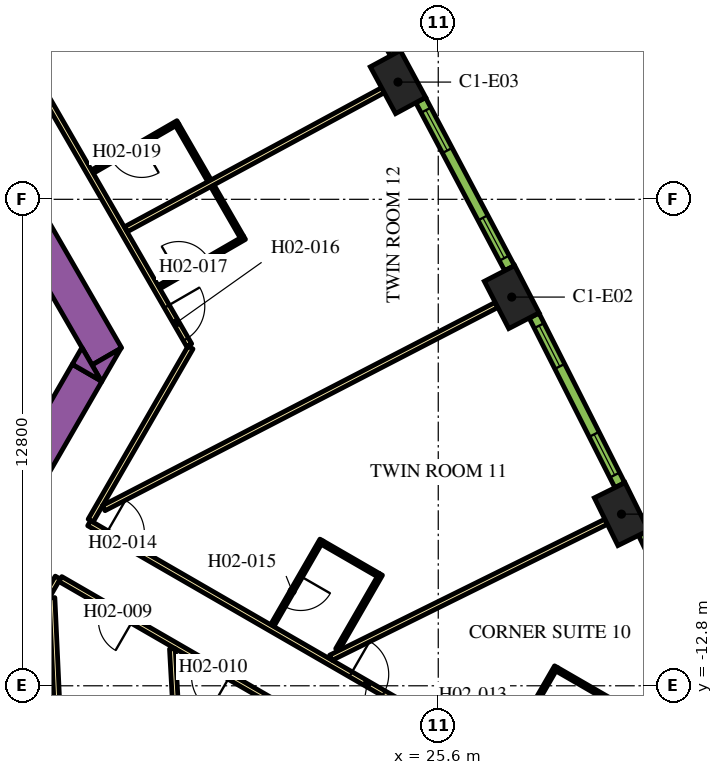
"""IFC4 building model, lengths in metres.
Left out: names, types, materials, properties, quantities, classifications, styles, units other than length and angle.
Written with IfcOpenShell. Run it as: python <this file> out.ifc"""

import sys

from ifc_helpers import new_model, si_unit, direction, frame, frame_2d, origin, origin_2d, place, context, subcontext, project, spatial, polyline, rectangle, outline, extrude, element, fill, save


model = new_model("IFC4")
c1 = context("Model", 3, precision=1e-05, world=origin(), true_north=direction((0.0, 1.0)))
c2 = subcontext(c1, "Body", "Model", "MODEL_VIEW")
j1 = project(units=[si_unit("LENGTHUNIT", "METRE"), si_unit("PLANEANGLEUNIT", "RADIAN")], contexts=[c1])
p1 = place(None, origin())
s1 = spatial("IfcSite", under=j1, at=p1, CompositionType="ELEMENT")
p2 = place(p1, origin())
s2 = spatial("IfcBuilding", under=s1, at=p2, CompositionType="ELEMENT")
p3 = place(p2, frame((0.0, 0.0, 47.1)))
s3 = spatial("IfcBuildingStorey", under=s2, at=p3, CompositionType="ELEMENT", Elevation=47.1)
for number, where, z_axis, x_axis in (
    (1, (30.421, -8.284, 0.0), (0.0, 0.0, 1.0), (-0.443, 0.897, 0.0)),
    (2, (27.533, -2.572, 0.0), (0.0, 0.0, 1.0), (-0.459, 0.888, 0.0)),
    (3, (24.54, 3.085, 0.0), (0.0, 0.0, 1.0), (-0.476, 0.88, 0.0)),
):
    element("IfcColumn", number, at=place(p3, frame(where, z_axis=z_axis, x_axis=x_axis)), inside=s3, PredefinedType="COLUMN", context=c2, shape_type="SweptSolid", body=[
        extrude(rectangle(XDim=1.4, YDim=0.9, at=origin_2d()), origin(), (0.0, 0.0, 1.0), 3.9),
    ])
p4 = place(p3, frame((6.776, 13.364, 0.0), z_axis=(0.0, 0.0, 1.0), x_axis=(0.500004177138, -0.8660229921, 0.0)))
e4 = element("IfcWall", 4, at=p4, inside=s3, PredefinedType="SOLIDWALL", context=c2, shape_type="SweptSolid", body=[
    extrude(rectangle(XDim=20.204, YDim=0.9, at=frame_2d((10.102, 0.0))), origin(), (0.0, 0.0, 1.0), 3.9),
])
p5 = place(p3, origin())
e5 = element("IfcWall", 5, at=p5, inside=s3, PredefinedType="SOLIDWALL", context=c2, shape_type="SweptSolid", body=[
    extrude(outline(polyline([(16.743, -4.8), (16.489, -4.36), (17.251, -3.92), (16.743, -4.8)])), origin(), (0.0, 0.0, 1.0), 3.9),
])
p6 = place(p3, frame((11.943, -12.214, 0.0), z_axis=(0.0, 0.0, 1.0), x_axis=(0.49998092645, 0.866036415623, 0.0)))
e6 = element("IfcWall", 6, at=p6, inside=s3, PredefinedType="SOLIDWALL", context=c2, shape_type="SweptSolid", body=[
    extrude(rectangle(XDim=8.83, YDim=0.9, at=frame_2d((4.415, 0.0))), origin(), (0.0, 0.0, 1.0), 3.9),
])
e7 = element("IfcWall", 7, at=p5, inside=s3, PredefinedType="SOLIDWALL", context=c2, shape_type="SweptSolid", body=[
    extrude(outline(polyline([(16.223, -3.9), (16.732, -4.78), (15.969, -4.34), (16.223, -3.9)])), origin(), (0.0, 0.0, 1.0), 3.9),
])
p7 = place(p3, frame((16.412, -8.523, 0.0), z_axis=(0.0, 0.0, 1.0), x_axis=(0.866022197818, -0.500005552856, 0.0)))
e8 = element("IfcWall", 8, at=p7, inside=s3, PredefinedType="PARTITIONING", context=c2, shape_type="SweptSolid", body=[
    extrude(rectangle(XDim=16.224, YDim=0.15, at=frame_2d((8.112, 0.0))), origin(), (0.0, 0.0, 1.0), 2.75),
])
p8 = place(p7, frame((7.949, 0.0, 0.0)))
e9 = element("IfcOpeningElement", 9, at=p8, cuts=e8, PredefinedType="OPENING", context=c2, shape_type="SweptSolid", body=[
    extrude(rectangle(XDim=1.0, YDim=2.1, at=frame_2d((0.5, 1.05))), frame((0.0, 0.085, 0.0), z_axis=(0.0, -1.0, 0.0), x_axis=(1.0, 0.0, 0.0)), (0.0, 0.0, 1.0), 0.17),
])
p9 = place(p7, frame((0.526, 0.0, 0.0)))
e10 = element("IfcOpeningElement", 10, at=p9, cuts=e8, PredefinedType="OPENING", context=c2, shape_type="SweptSolid", body=[
    extrude(rectangle(XDim=1.0, YDim=2.1, at=frame_2d((0.5, 1.05))), frame((0.0, 0.085, 0.0), z_axis=(0.0, -1.0, 0.0), x_axis=(1.0, 0.0, 0.0)), (0.0, 0.0, 1.0), 0.17),
])
p10 = place(p3, frame((19.081, -3.9, 0.0), z_axis=(0.0, 0.0, 1.0), x_axis=(-0.499974327079, -0.866040225545, 0.0)))
e11 = element("IfcWall", 11, at=p10, inside=s3, PredefinedType="PARTITIONING", context=c2, shape_type="SweptSolid", body=[
    extrude(rectangle(XDim=5.258, YDim=0.15, at=frame_2d((2.629, 0.0))), origin(), (0.0, 0.0, 1.0), 2.75),
])
p11 = place(p3, frame((6.163, 18.475, 0.0), z_axis=(0.0, 0.0, 1.0), x_axis=(0.500001317485, -0.866024643133, 0.0)))
e12 = element("IfcWall", 12, at=p11, inside=s3, PredefinedType="PARTITIONING", context=c2, shape_type="SweptSolid", body=[
    extrude(rectangle(XDim=25.767, YDim=0.15, at=frame_2d((12.883, 0.0))), origin(), (0.0, 0.0, 1.0), 2.75),
])
p12 = place(p11, frame((24.586, 0.0, 0.0)))
e13 = element("IfcOpeningElement", 13, at=p12, cuts=e12, PredefinedType="OPENING", context=c2, shape_type="SweptSolid", body=[
    extrude(rectangle(XDim=1.0, YDim=2.1, at=frame_2d((0.5, 1.05))), frame((0.0, 0.085, 0.0), z_axis=(0.0, -1.0, 0.0), x_axis=(1.0, 0.0, 0.0)), (0.0, 0.0, 1.0), 0.17),
])
p13 = place(p11, frame((16.196, 0.0, 0.0)))
e14 = element("IfcOpeningElement", 14, at=p13, cuts=e12, PredefinedType="OPENING", context=c2, shape_type="SweptSolid", body=[
    extrude(rectangle(XDim=1.0, YDim=2.1, at=frame_2d((0.5, 1.05))), frame((0.0, 0.085, 0.0), z_axis=(0.0, -1.0, 0.0), x_axis=(1.0, 0.0, 0.0)), (0.0, 0.0, 1.0), 0.17),
])
p14 = place(p11, frame((14.789, 0.0, 0.0)))
e15 = element("IfcOpeningElement", 15, at=p14, cuts=e12, PredefinedType="OPENING", context=c2, shape_type="SweptSolid", body=[
    extrude(rectangle(XDim=1.1, YDim=2.1, at=frame_2d((0.55, 1.05))), frame((0.0, 0.085, 0.0), z_axis=(0.0, -1.0, 0.0), x_axis=(1.0, 0.0, 0.0)), (0.0, 0.0, 1.0), 0.17),
])
p15 = place(p11, frame((3.698, 0.0, 0.0)))
e16 = element("IfcOpeningElement", 16, at=p15, cuts=e12, PredefinedType="OPENING", context=c2, shape_type="SweptSolid", body=[
    extrude(rectangle(XDim=1.0, YDim=2.1, at=frame_2d((0.5, 1.05))), frame((0.0, 0.085, 0.0), z_axis=(0.0, -1.0, 0.0), x_axis=(1.0, 0.0, 0.0)), (0.0, 0.0, 1.0), 0.17),
])
p16 = place(p11, frame((2.391, 0.0, 0.0)))
e17 = element("IfcOpeningElement", 17, at=p16, cuts=e12, PredefinedType="OPENING", context=c2, shape_type="SweptSolid", body=[
    extrude(rectangle(XDim=1.0, YDim=2.1, at=frame_2d((0.5, 1.05))), frame((0.0, 0.085, 0.0), z_axis=(0.0, -1.0, 0.0), x_axis=(1.0, 0.0, 0.0)), (0.0, 0.0, 1.0), 0.17),
])
p17 = place(p3, frame((15.587, -9.952, 0.0), z_axis=(0.0, 0.0, 1.0), x_axis=(-0.500016618951, -0.866015808616, 0.0)))
e18 = element("IfcWall", 18, at=p17, inside=s3, PredefinedType="PARTITIONING", context=c2, shape_type="SweptSolid", body=[
    extrude(rectangle(XDim=5.268, YDim=0.15, at=frame_2d((2.634, 0.0))), origin(), (0.0, 0.0, 1.0), 2.75),
])
p18 = place(p17, frame((2.465, 0.0, 0.0)))
e19 = element("IfcOpeningElement", 19, at=p18, cuts=e18, PredefinedType="OPENING", context=c2, shape_type="SweptSolid", body=[
    extrude(rectangle(XDim=0.9, YDim=2.1, at=frame_2d((0.45, 1.05))), frame((0.0, 0.085, 0.0), z_axis=(0.0, -1.0, 0.0), x_axis=(1.0, 0.0, 0.0)), (0.0, 0.0, 1.0), 0.17),
])
p19 = place(p3, frame((29.638, -18.064, 0.0), z_axis=(0.0, 0.0, 1.0), x_axis=(-0.866026175601, 0.499998663172, 0.0)))
e20 = element("IfcWall", 20, at=p19, inside=s3, PredefinedType="PARTITIONING", context=c2, shape_type="SweptSolid", body=[
    extrude(rectangle(XDim=16.144, YDim=0.15, at=frame_2d((8.072, 0.0))), origin(), (0.0, 0.0, 1.0), 2.75),
])
p20 = place(p19, frame((13.948, 0.0, 0.0)))
e21 = element("IfcOpeningElement", 21, at=p20, cuts=e20, PredefinedType="OPENING", context=c2, shape_type="SweptSolid", body=[
    extrude(rectangle(XDim=0.9, YDim=2.1, at=frame_2d((0.45, 1.05))), frame((0.0, 0.085, 0.0), z_axis=(0.0, -1.0, 0.0), x_axis=(1.0, 0.0, 0.0)), (0.0, 0.0, 1.0), 0.17),
])
p21 = place(p19, frame((11.004, 0.0, 0.0)))
e22 = element("IfcOpeningElement", 22, at=p21, cuts=e20, PredefinedType="OPENING", context=c2, shape_type="SweptSolid", body=[
    extrude(rectangle(XDim=1.0, YDim=2.1, at=frame_2d((0.5, 1.05))), frame((0.0, 0.085, 0.0), z_axis=(0.0, -1.0, 0.0), x_axis=(1.0, 0.0, 0.0)), (0.0, 0.0, 1.0), 0.17),
])
p22 = place(p3, frame((15.973, -22.109, 0.0), z_axis=(0.0, 0.0, 1.0), x_axis=(-0.046191717129, 0.998932592955, 0.0)))
e23 = element("IfcWall", 23, at=p22, inside=s3, PredefinedType="PARTITIONING", context=c2, shape_type="SweptSolid", body=[
    extrude(rectangle(XDim=11.638, YDim=0.15, at=frame_2d((5.819, 0.0))), origin(), (0.0, 0.0, 1.0), 2.75),
])
p23 = place(p3, frame((27.134, -2.779, 0.0), z_axis=(0.0, 0.0, 1.0), x_axis=(-0.8882049501, -0.459447457951, 0.0)))
e24 = element("IfcWall", 24, at=p23, inside=s3, PredefinedType="PARTITIONING", context=c2, shape_type="SweptSolid", body=[
    extrude(rectangle(XDim=11.638, YDim=0.15, at=frame_2d((5.819, 0.0))), origin(), (0.0, 0.0, 1.0), 2.75),
])
p24 = place(p3, frame((24.145, 2.871, 0.0), z_axis=(0.0, 0.0, 1.0), x_axis=(-0.879551725039, -0.475803281809, 0.0)))
e25 = element("IfcWall", 25, at=p24, inside=s3, PredefinedType="PARTITIONING", context=c2, shape_type="SweptSolid", body=[
    extrude(rectangle(XDim=7.688, YDim=0.15, at=frame_2d((3.844, 0.0))), origin(), (0.0, 0.0, 1.0), 2.75),
])
p25 = place(p3, frame((19.198, -22.541, 0.0), z_axis=(0.0, 0.0, 1.0), x_axis=(-0.055432210572, 0.99846245299, 0.0)))
e26 = element("IfcWall", 26, at=p25, inside=s3, PredefinedType="PARTITIONING", context=c2, shape_type="SweptSolid", body=[
    extrude(rectangle(XDim=10.729, YDim=0.15, at=frame_2d((5.365, 0.0))), origin(), (0.0, 0.0, 1.0), 2.75),
])
p26 = place(p3, frame((30.018, -8.483, 0.0), z_axis=(0.0, 0.0, 1.0), x_axis=(-0.896544505264, -0.44295366584, 0.0)))
e27 = element("IfcWall", 27, at=p26, inside=s3, PredefinedType="PARTITIONING", context=c2, shape_type="SweptSolid", body=[
    extrude(rectangle(XDim=8.079, YDim=0.15, at=frame_2d((4.04, 0.0))), origin(), (0.0, 0.0, 1.0), 2.75),
])
p27 = place(p3, frame((28.704, -12.3, 0.0), z_axis=(0.0, 0.0, 1.0), x_axis=(-0.49998411664, -0.866034573852, 0.0)))
e28 = element("IfcWall", 28, at=p27, inside=s3, PredefinedType="PARTITIONING", context=c2, shape_type="SweptSolid", body=[
    extrude(rectangle(XDim=2.8, YDim=0.1, at=frame_2d((1.4, 0.0))), origin(), (0.0, 0.0, 1.0), 2.75),
])
p28 = place(p27, frame((1.3, 0.0, 0.0)))
e29 = element("IfcOpeningElement", 29, at=p28, cuts=e28, PredefinedType="OPENING", context=c2, shape_type="SweptSolid", body=[
    extrude(rectangle(XDim=0.9, YDim=2.1, at=frame_2d((0.45, 1.05))), frame((0.0, 0.06, 0.0), z_axis=(0.0, -1.0, 0.0), x_axis=(1.0, 0.0, 0.0)), (0.0, 0.0, 1.0), 0.12),
])
p29 = place(p3, frame((28.722, -12.368, 0.0), z_axis=(0.0, 0.0, 1.0), x_axis=(0.866050077142, -0.499957262057, 0.0)))
e30 = element("IfcWall", 30, at=p29, inside=s3, PredefinedType="PARTITIONING", context=c2, shape_type="SweptSolid", body=[
    extrude(rectangle(XDim=2.4, YDim=0.1, at=frame_2d((1.2, 0.0))), origin(), (0.0, 0.0, 1.0), 2.75),
])
p30 = place(p3, frame((22.53, -8.966, 0.0), z_axis=(0.0, 0.0, 1.0), x_axis=(-0.500006934395, -0.866021400173, 0.0)))
e31 = element("IfcWall", 31, at=p30, inside=s3, PredefinedType="PARTITIONING", context=c2, shape_type="SweptSolid", body=[
    extrude(rectangle(XDim=2.6, YDim=0.1, at=frame_2d((1.3, 0.0))), origin(), (0.0, 0.0, 1.0), 2.75),
])
p31 = place(p30, frame((1.1, 0.0, 0.0)))
e32 = element("IfcOpeningElement", 32, at=p31, cuts=e31, PredefinedType="OPENING", context=c2, shape_type="SweptSolid", body=[
    extrude(rectangle(XDim=0.9, YDim=2.1, at=frame_2d((0.45, 1.05))), frame((0.0, 0.06, 0.0), z_axis=(0.0, -1.0, 0.0), x_axis=(1.0, 0.0, 0.0)), (0.0, 0.0, 1.0), 0.12),
])
p32 = place(p3, frame((22.549, -9.035, 0.0), z_axis=(0.0, 0.0, 1.0), x_axis=(0.86605165483, -0.499954529098, 0.0)))
e33 = element("IfcWall", 33, at=p32, inside=s3, PredefinedType="PARTITIONING", context=c2, shape_type="SweptSolid", body=[
    extrude(rectangle(XDim=1.7, YDim=0.1, at=frame_2d((0.85, 0.0))), origin(), (0.0, 0.0, 1.0), 2.75),
])
p33 = place(p3, frame((22.944, -11.85, 0.0), z_axis=(0.0, 0.0, 1.0), x_axis=(0.499968531483, 0.866043571379, 0.0)))
e34 = element("IfcWall", 34, at=p33, inside=s3, PredefinedType="PARTITIONING", context=c2, shape_type="SweptSolid", body=[
    extrude(rectangle(XDim=2.29, YDim=0.1, at=frame_2d((1.145, 0.0))), origin(), (0.0, 0.0, 1.0), 2.75),
])
p34 = place(p3, frame((18.25, -2.311, 0.0), z_axis=(0.0, 0.0, 1.0), x_axis=(0.866021400173, 0.500006934395, 0.0)))
e35 = element("IfcWall", 35, at=p34, inside=s3, PredefinedType="PARTITIONING", context=c2, shape_type="SweptSolid", body=[
    extrude(rectangle(XDim=2.6, YDim=0.1, at=frame_2d((1.3, 0.0))), origin(), (0.0, 0.0, 1.0), 2.75),
])
p35 = place(p34, frame((0.6, 0.0, 0.0)))
e36 = element("IfcOpeningElement", 36, at=p35, cuts=e35, PredefinedType="OPENING", context=c2, shape_type="SweptSolid", body=[
    extrude(rectangle(XDim=0.9, YDim=2.1, at=frame_2d((0.45, 1.05))), frame((0.0, 0.06, 0.0), z_axis=(0.0, -1.0, 0.0), x_axis=(1.0, 0.0, 0.0)), (0.0, 0.0, 1.0), 0.12),
])
p36 = place(p3, frame((20.434, -0.993, 0.0), z_axis=(0.0, 0.0, 1.0), x_axis=(-0.500086022567, 0.865975732936, 0.0)))
e37 = element("IfcWall", 37, at=p36, inside=s3, PredefinedType="PARTITIONING", context=c2, shape_type="SweptSolid", body=[
    extrude(rectangle(XDim=1.55, YDim=0.1, at=frame_2d((0.775, 0.0))), origin(), (0.0, 0.0, 1.0), 2.75),
])
p37 = place(p3, frame((18.749, 2.026, 0.0), z_axis=(0.0, 0.0, 1.0), x_axis=(-0.866021400173, -0.500006934395, 0.0)))
e38 = element("IfcWall", 38, at=p37, inside=s3, PredefinedType="PARTITIONING", context=c2, shape_type="SweptSolid", body=[
    extrude(rectangle(XDim=2.6, YDim=0.1, at=frame_2d((1.3, 0.0))), origin(), (0.0, 0.0, 1.0), 2.75),
])
p38 = place(p37, frame((1.1, 0.0, 0.0)))
e39 = element("IfcOpeningElement", 39, at=p38, cuts=e38, PredefinedType="OPENING", context=c2, shape_type="SweptSolid", body=[
    extrude(rectangle(XDim=0.9, YDim=2.1, at=frame_2d((0.45, 1.05))), frame((0.0, 0.06, 0.0), z_axis=(0.0, -1.0, 0.0), x_axis=(1.0, 0.0, 0.0)), (0.0, 0.0, 1.0), 0.12),
])
p39 = place(p3, frame((18.731, 1.958, 0.0), z_axis=(0.0, 0.0, 1.0), x_axis=(0.499976720371, -0.866038843867, 0.0)))
e40 = element("IfcWall", 40, at=p39, inside=s3, PredefinedType="PARTITIONING", context=c2, shape_type="SweptSolid", body=[
    extrude(rectangle(XDim=1.69, YDim=0.1, at=frame_2d((0.845, 0.0))), origin(), (0.0, 0.0, 1.0), 2.75),
])
p40 = place(p3, frame((33.176, -13.29, 0.0), z_axis=(0.0, 0.0, 1.0), x_axis=(-0.434664499056, 0.900592456808, 0.0)))
e41 = element("IfcWall", 41, at=p40, inside=s3, PredefinedType="SOLIDWALL", context=c2, shape_type="SweptSolid", body=[
    extrude(rectangle(XDim=5.006, YDim=0.29, at=frame_2d((2.503, 0.0))), origin(), (0.0, 0.0, 1.0), 3.65),
])
p41 = place(p40, frame((0.265, 0.0, 0.9)))
e42 = element("IfcOpeningElement", 42, at=p41, cuts=e41, PredefinedType="OPENING", context=c2, shape_type="SweptSolid", body=[
    extrude(rectangle(XDim=1.2, YDim=2.15, at=frame_2d((0.6, 1.075))), frame((0.0, 0.155, 0.0), z_axis=(0.0, -1.0, 0.0), x_axis=(1.0, 0.0, 0.0)), (0.0, 0.0, 1.0), 0.31),
])
p42 = place(p40, frame((3.496, 0.0, 0.9)))
e43 = element("IfcOpeningElement", 43, at=p42, cuts=e41, PredefinedType="OPENING", context=c2, shape_type="SweptSolid", body=[
    extrude(rectangle(XDim=1.2, YDim=2.15, at=frame_2d((0.6, 1.075))), frame((0.0, 0.155, 0.0), z_axis=(0.0, -1.0, 0.0), x_axis=(1.0, 0.0, 0.0)), (0.0, 0.0, 1.0), 0.31),
])
p43 = place(p3, frame((30.377, -7.521, 0.0), z_axis=(0.0, 0.0, 1.0), x_axis=(-0.451233929645, 0.892405704115, 0.0)))
e44 = element("IfcWall", 44, at=p43, inside=s3, PredefinedType="SOLIDWALL", context=c2, shape_type="SweptSolid", body=[
    extrude(rectangle(XDim=4.998, YDim=0.29, at=frame_2d((2.499, 0.0))), origin(), (0.0, 0.0, 1.0), 3.65),
])
p44 = place(p43, frame((0.297, 0.0, 0.9)))
e45 = element("IfcOpeningElement", 45, at=p44, cuts=e44, PredefinedType="OPENING", context=c2, shape_type="SweptSolid", body=[
    extrude(rectangle(XDim=1.2, YDim=2.15, at=frame_2d((0.6, 1.075))), frame((0.0, 0.155, 0.0), z_axis=(0.0, -1.0, 0.0), x_axis=(1.0, 0.0, 0.0)), (0.0, 0.0, 1.0), 0.31),
])
p45 = place(p43, frame((3.501, 0.0, 0.9)))
e46 = element("IfcOpeningElement", 46, at=p45, cuts=e44, PredefinedType="OPENING", context=c2, shape_type="SweptSolid", body=[
    extrude(rectangle(XDim=1.2, YDim=2.15, at=frame_2d((0.6, 1.075))), frame((0.0, 0.155, 0.0), z_axis=(0.0, -1.0, 0.0), x_axis=(1.0, 0.0, 0.0)), (0.0, 0.0, 1.0), 0.31),
])
p46 = place(p3, frame((27.475, -1.81, 0.0), z_axis=(0.0, 0.0, 1.0), x_axis=(-0.467629620899, 0.883924509026, 0.0)))
e47 = element("IfcWall", 47, at=p46, inside=s3, PredefinedType="SOLIDWALL", context=c2, shape_type="SweptSolid", body=[
    extrude(rectangle(XDim=4.998, YDim=0.29, at=frame_2d((2.499, 0.0))), origin(), (0.0, 0.0, 1.0), 3.65),
])
p47 = place(p46, frame((0.297, 0.0, 0.9)))
e48 = element("IfcOpeningElement", 48, at=p47, cuts=e47, PredefinedType="OPENING", context=c2, shape_type="SweptSolid", body=[
    extrude(rectangle(XDim=1.2, YDim=2.15, at=frame_2d((0.6, 1.075))), frame((0.0, 0.155, 0.0), z_axis=(0.0, -1.0, 0.0), x_axis=(1.0, 0.0, 0.0)), (0.0, 0.0, 1.0), 0.31),
])
p48 = place(p46, frame((3.501, 0.0, 0.9)))
e49 = element("IfcOpeningElement", 49, at=p48, cuts=e47, PredefinedType="OPENING", context=c2, shape_type="SweptSolid", body=[
    extrude(rectangle(XDim=1.2, YDim=2.15, at=frame_2d((0.6, 1.075))), frame((0.0, 0.155, 0.0), z_axis=(0.0, -1.0, 0.0), x_axis=(1.0, 0.0, 0.0)), (0.0, 0.0, 1.0), 0.31),
])
p49 = place(p3, frame((24.468, 3.846, 0.0), z_axis=(0.0, 0.0, 1.0), x_axis=(-0.483912572871, 0.875116347589, 0.0)))
e50 = element("IfcWall", 50, at=p49, inside=s3, PredefinedType="SOLIDWALL", context=c2, shape_type="SweptSolid", body=[
    extrude(rectangle(XDim=4.998, YDim=0.29, at=frame_2d((2.499, 0.0))), origin(), (0.0, 0.0, 1.0), 3.65),
])
p50 = place(p49, frame((0.297, 0.0, 0.9)))
e51 = element("IfcOpeningElement", 51, at=p50, cuts=e50, PredefinedType="OPENING", context=c2, shape_type="SweptSolid", body=[
    extrude(rectangle(XDim=1.2, YDim=2.15, at=frame_2d((0.6, 1.075))), frame((0.0, 0.155, 0.0), z_axis=(0.0, -1.0, 0.0), x_axis=(1.0, 0.0, 0.0)), (0.0, 0.0, 1.0), 0.31),
])
p51 = place(p49, frame((3.501, 0.0, 0.9)))
e52 = element("IfcOpeningElement", 52, at=p51, cuts=e50, PredefinedType="OPENING", context=c2, shape_type="SweptSolid", body=[
    extrude(rectangle(XDim=1.2, YDim=2.15, at=frame_2d((0.6, 1.075))), frame((0.0, 0.155, 0.0), z_axis=(0.0, -1.0, 0.0), x_axis=(1.0, 0.0, 0.0)), (0.0, 0.0, 1.0), 0.31),
])
p52 = place(p20, origin())
e53 = element("IfcDoor", 53, at=p52, inside=s3, OperationType="SINGLE_SWING_RIGHT", PredefinedType="DOOR", context=c2, shape_type="SweptSolid", body=[
    extrude(rectangle(XDim=0.9, YDim=2.1, at=frame_2d((0.45, 1.05))), frame((0.0, 0.025, 0.0), z_axis=(0.0, -1.0, 0.0), x_axis=(1.0, 0.0, 0.0)), (0.0, 0.0, 1.0), 0.05),
])
fill(e21, e53)
p53 = place(p21, origin())
e54 = element("IfcDoor", 54, at=p53, inside=s3, OperationType="SINGLE_SWING_RIGHT", PredefinedType="DOOR", context=c2, shape_type="SweptSolid", body=[
    extrude(rectangle(XDim=1.0, YDim=2.1, at=frame_2d((0.5, 1.05))), frame((0.0, 0.025, 0.0), z_axis=(0.0, -1.0, 0.0), x_axis=(1.0, 0.0, 0.0)), (0.0, 0.0, 1.0), 0.05),
])
fill(e22, e54)
p54 = place(p8, origin())
e55 = element("IfcDoor", 55, at=p54, inside=s3, OperationType="SINGLE_SWING_LEFT", PredefinedType="DOOR", context=c2, shape_type="SweptSolid", body=[
    extrude(rectangle(XDim=1.0, YDim=2.1, at=frame_2d((0.5, 1.05))), frame((0.0, 0.025, 0.0), z_axis=(0.0, -1.0, 0.0), x_axis=(1.0, 0.0, 0.0)), (0.0, 0.0, 1.0), 0.05),
])
fill(e9, e55)
p55 = place(p9, origin())
e56 = element("IfcDoor", 56, at=p55, inside=s3, OperationType="SINGLE_SWING_LEFT", PredefinedType="DOOR", context=c2, shape_type="SweptSolid", body=[
    extrude(rectangle(XDim=1.0, YDim=2.1, at=frame_2d((0.5, 1.05))), frame((0.0, 0.025, 0.0), z_axis=(0.0, -1.0, 0.0), x_axis=(1.0, 0.0, 0.0)), (0.0, 0.0, 1.0), 0.05),
])
fill(e10, e56)
p56 = place(p31, origin())
e57 = element("IfcDoor", 57, at=p56, inside=s3, OperationType="SINGLE_SWING_LEFT", PredefinedType="DOOR", context=c2, shape_type="SweptSolid", body=[
    extrude(rectangle(XDim=0.9, YDim=2.1, at=frame_2d((0.45, 1.05))), frame((0.0, 0.025, 0.0), z_axis=(0.0, -1.0, 0.0), x_axis=(1.0, 0.0, 0.0)), (0.0, 0.0, 1.0), 0.05),
])
fill(e32, e57)
p57 = place(p12, origin())
e58 = element("IfcDoor", 58, at=p57, inside=s3, OperationType="SINGLE_SWING_RIGHT", PredefinedType="DOOR", context=c2, shape_type="SweptSolid", body=[
    extrude(rectangle(XDim=1.0, YDim=2.1, at=frame_2d((0.5, 1.05))), frame((0.0, 0.025, 0.0), z_axis=(0.0, -1.0, 0.0), x_axis=(1.0, 0.0, 0.0)), (0.0, 0.0, 1.0), 0.05),
])
fill(e13, e58)
p58 = place(p35, origin())
e59 = element("IfcDoor", 59, at=p58, inside=s3, OperationType="SINGLE_SWING_RIGHT", PredefinedType="DOOR", context=c2, shape_type="SweptSolid", body=[
    extrude(rectangle(XDim=0.9, YDim=2.1, at=frame_2d((0.45, 1.05))), frame((0.0, 0.025, 0.0), z_axis=(0.0, -1.0, 0.0), x_axis=(1.0, 0.0, 0.0)), (0.0, 0.0, 1.0), 0.05),
])
fill(e36, e59)
p59 = place(p38, origin())
e60 = element("IfcDoor", 60, at=p59, inside=s3, OperationType="SINGLE_SWING_LEFT", PredefinedType="DOOR", context=c2, shape_type="SweptSolid", body=[
    extrude(rectangle(XDim=0.9, YDim=2.1, at=frame_2d((0.45, 1.05))), frame((0.0, 0.025, 0.0), z_axis=(0.0, -1.0, 0.0), x_axis=(1.0, 0.0, 0.0)), (0.0, 0.0, 1.0), 0.05),
])
fill(e39, e60)
p60 = place(p44, origin())
e61 = element("IfcWindow", 61, at=p60, inside=s3, PartitioningType="DOUBLE_PANEL_VERTICAL", PredefinedType="WINDOW", context=c2, shape_type="SweptSolid", body=[
    extrude(rectangle(XDim=1.2, YDim=2.15, at=frame_2d((0.6, 1.075))), frame((0.0, 0.015, 0.0), z_axis=(0.0, -1.0, 0.0), x_axis=(1.0, 0.0, 0.0)), (0.0, 0.0, 1.0), 0.06),
])
fill(e45, e61)
p61 = place(p45, origin())
e62 = element("IfcWindow", 62, at=p61, inside=s3, PartitioningType="DOUBLE_PANEL_VERTICAL", PredefinedType="WINDOW", context=c2, shape_type="SweptSolid", body=[
    extrude(rectangle(XDim=1.2, YDim=2.15, at=frame_2d((0.6, 1.075))), frame((0.0, 0.015, 0.0), z_axis=(0.0, -1.0, 0.0), x_axis=(1.0, 0.0, 0.0)), (0.0, 0.0, 1.0), 0.06),
])
fill(e46, e62)
p62 = place(p47, origin())
e63 = element("IfcWindow", 63, at=p62, inside=s3, PartitioningType="DOUBLE_PANEL_VERTICAL", PredefinedType="WINDOW", context=c2, shape_type="SweptSolid", body=[
    extrude(rectangle(XDim=1.2, YDim=2.15, at=frame_2d((0.6, 1.075))), frame((0.0, 0.015, 0.0), z_axis=(0.0, -1.0, 0.0), x_axis=(1.0, 0.0, 0.0)), (0.0, 0.0, 1.0), 0.06),
])
fill(e48, e63)
p63 = place(p48, origin())
e64 = element("IfcWindow", 64, at=p63, inside=s3, PartitioningType="DOUBLE_PANEL_VERTICAL", PredefinedType="WINDOW", context=c2, shape_type="SweptSolid", body=[
    extrude(rectangle(XDim=1.2, YDim=2.15, at=frame_2d((0.6, 1.075))), frame((0.0, 0.015, 0.0), z_axis=(0.0, -1.0, 0.0), x_axis=(1.0, 0.0, 0.0)), (0.0, 0.0, 1.0), 0.06),
])
fill(e49, e64)
save(model, sys.argv[1])
